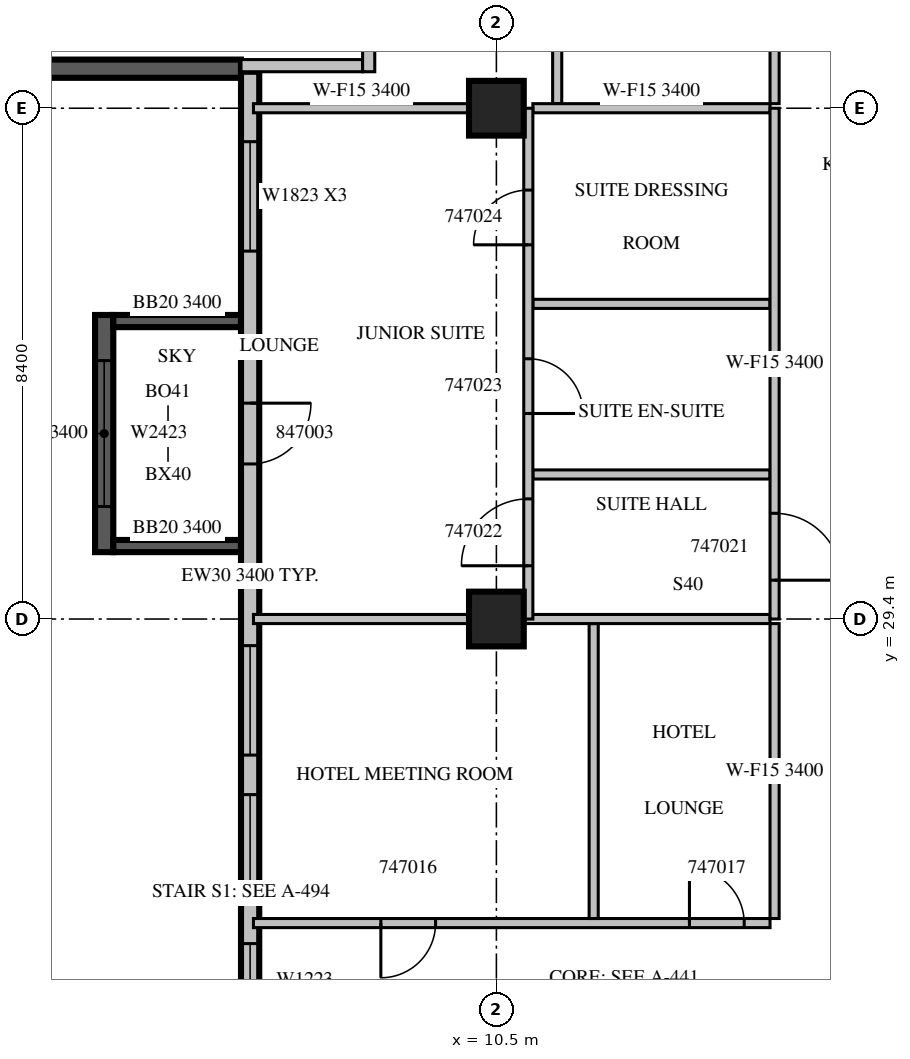
"""IFC4 building model, lengths in metres.
Left out: names, types, materials, properties, quantities, classifications, styles, units other than length and angle.
Written with IfcOpenShell. Run it as: python <this file> out.ifc"""

import sys

from ifc_helpers import new_model, si_unit, direction, frame, frame_2d, origin, origin_2d, place, context, subcontext, project, spatial, rectangle, extrude, source, transform, mapped, element, fill, save


model = new_model("IFC4")
c1 = context("Model", 3, precision=1e-05, world=origin(), true_north=direction((0.0, 1.0)))
c2 = subcontext(c1, "Body", "Model", "MODEL_VIEW")
j1 = project(units=[si_unit("LENGTHUNIT", "METRE"), si_unit("PLANEANGLEUNIT", "RADIAN")], contexts=[c1])
p1 = place(None, origin())
s1 = spatial("IfcSite", under=j1, at=p1, CompositionType="ELEMENT")
p2 = place(p1, origin())
s2 = spatial("IfcBuilding", under=s1, at=p2, CompositionType="ELEMENT")
p3 = place(p2, frame((0.0, 0.0, 212.0)))
s3 = spatial("IfcBuildingStorey", under=s2, at=p3, CompositionType="ELEMENT", Elevation=212.0)
m1 = source(origin(), c2, "Body", "SweptSolid", [
    extrude(rectangle(XDim=0.9, YDim=0.9, at=origin_2d()), origin(), (0.0, 0.0, 1.0), 3.8),
])
for number, where, z_axis, x_axis in (
    (1, (10.5, 29.4, 0.0), (0.0, 0.0, 1.0), (1.0, 0.0, 0.0)),
    (2, (10.5, 37.8, 0.0), (0.0, 0.0, 1.0), (1.0, 0.0, 0.0)),
):
    element("IfcColumn", number, at=place(p3, frame(where, z_axis=z_axis, x_axis=x_axis)), inside=s3, PredefinedType="COLUMN", context=c2, shape_type="MappedRepresentation", body=[
        mapped(m1, transform((0.0, 0.0, 0.0), scale=1.0)),
    ])
m2 = source(origin(), c2, "Body", "SweptSolid", [
    extrude(rectangle(XDim=3.9, YDim=0.3, at=frame_2d((1.95, 0.0))), origin(), (0.0, 0.0, 1.0), 3.4),
])
p4 = place(p3, frame((4.05, 34.4, 0.0), z_axis=(0.0, 0.0, 1.0), x_axis=(0.0, -1.0, 0.0)))
e3 = element("IfcWall", 3, at=p4, inside=s3, PredefinedType="SOLIDWALL", context=c2, shape_type="MappedRepresentation", body=[
    mapped(m2, transform((0.0, 0.0, 0.0), scale=1.0)),
])
m3 = source(origin(), c2, "Body", "SweptSolid", [
    extrude(rectangle(XDim=2.4, YDim=2.3, at=frame_2d((1.2, 1.15))), frame((0.0, 0.16, 0.0), z_axis=(0.0, -1.0, 0.0), x_axis=(1.0, 0.0, 0.0)), (0.0, 0.0, 1.0), 0.32),
])
p5 = place(p4, frame((0.75, 0.0, 0.6)))
e4 = element("IfcOpeningElement", 4, at=p5, cuts=e3, PredefinedType="OPENING", context=c2, shape_type="MappedRepresentation", body=[
    mapped(m3, transform((0.0, 0.0, 0.0), scale=1.0)),
])
m4 = source(origin(), c2, "Body", "SweptSolid", [
    extrude(rectangle(XDim=2.1, YDim=0.2, at=frame_2d((1.05, 0.0))), origin(), (0.0, 0.0, 1.0), 3.4),
])
for number, where, z_axis, x_axis in (
    (5, (6.3, 34.3, 0.0), (0.0, 0.0, 1.0), (-1.0, 0.0, 0.0)),
    (6, (6.3, 30.6, 0.0), (0.0, 0.0, 1.0), (-1.0, 0.0, 0.0)),
):
    element("IfcWall", number, at=place(p3, frame(where, z_axis=z_axis, x_axis=x_axis)), inside=s3, PredefinedType="SOLIDWALL", context=c2, shape_type="MappedRepresentation", body=[
        mapped(m4, transform((0.0, 0.0, 0.0), scale=1.0)),
    ])
m5 = source(origin(), c2, "Body", "SweptSolid", [
    extrude(rectangle(XDim=6.1, YDim=0.3, at=frame_2d((3.05, 0.0))), origin(), (0.0, 0.0, 1.0), 3.4),
])
p6 = place(p3, frame((0.2, 38.45, 0.0), z_axis=(0.0, 0.0, 1.0), x_axis=(1.0, 0.0, 0.0)))
e7 = element("IfcWall", 7, at=p6, inside=s3, PredefinedType="SOLIDWALL", context=c2, shape_type="MappedRepresentation", body=[
    mapped(m5, transform((0.0, 0.0, 0.0), scale=1.0)),
])
m6 = source(origin(), c2, "Body", "SweptSolid", [
    extrude(rectangle(XDim=16.6, YDim=0.3, at=frame_2d((8.3, 0.0))), origin(), (0.0, 0.0, 1.0), 3.4),
])
p7 = place(p3, frame((6.45, 38.4, 0.0), z_axis=(0.0, 0.0, 1.0), x_axis=(0.0, -1.0, 0.0)))
e8 = element("IfcWall", 8, at=p7, inside=s3, PredefinedType="STANDARD", context=c2, shape_type="MappedRepresentation", body=[
    mapped(m6, transform((0.0, 0.0, 0.0), scale=1.0)),
])
m7 = source(origin(), c2, "Body", "SweptSolid", [
    extrude(rectangle(XDim=1.8, YDim=2.3, at=frame_2d((0.9, 1.15))), frame((0.0, 0.16, 0.0), z_axis=(0.0, -1.0, 0.0), x_axis=(1.0, 0.0, 0.0)), (0.0, 0.0, 1.0), 0.32),
])
p8 = place(p7, frame((1.15, 0.0, 0.6)))
e9 = element("IfcOpeningElement", 9, at=p8, cuts=e8, PredefinedType="OPENING", context=c2, shape_type="MappedRepresentation", body=[
    mapped(m7, transform((0.0, 0.0, 0.0), scale=1.0)),
])
p9 = place(p7, frame((9.438, 0.0, 0.6)))
e10 = element("IfcOpeningElement", 10, at=p9, cuts=e8, PredefinedType="OPENING", context=c2, shape_type="MappedRepresentation", body=[
    mapped(m7, transform((0.0, 0.0, 0.0), scale=1.0)),
])
m8 = source(origin(), c2, "Body", "SweptSolid", [
    extrude(rectangle(XDim=1.2, YDim=2.3, at=frame_2d((0.6, 1.15))), frame((0.0, 0.16, 0.0), z_axis=(0.0, -1.0, 0.0), x_axis=(1.0, 0.0, 0.0)), (0.0, 0.0, 1.0), 0.32),
])
p10 = place(p7, frame((14.338, 0.0, 0.6)))
e11 = element("IfcOpeningElement", 11, at=p10, cuts=e8, PredefinedType="OPENING", context=c2, shape_type="MappedRepresentation", body=[
    mapped(m8, transform((0.0, 0.0, 0.0), scale=1.0)),
])
p11 = place(p7, frame((11.887, 0.0, 0.6)))
e12 = element("IfcOpeningElement", 12, at=p11, cuts=e8, PredefinedType="OPENING", context=c2, shape_type="MappedRepresentation", body=[
    mapped(m7, transform((0.0, 0.0, 0.0), scale=1.0)),
])
m9 = source(origin(), c2, "Body", "SweptSolid", [
    extrude(rectangle(XDim=1.0, YDim=2.1, at=frame_2d((0.5, 1.05))), frame((0.0, 0.16, 0.0), z_axis=(0.0, -1.0, 0.0), x_axis=(1.0, 0.0, 0.0)), (0.0, 0.0, 1.0), 0.32),
])
p12 = place(p7, frame((5.45, 0.0, 0.0)))
e13 = element("IfcOpeningElement", 13, at=p12, cuts=e8, PredefinedType="OPENING", context=c2, shape_type="MappedRepresentation", body=[
    mapped(m9, transform((0.0, 0.0, 0.0), scale=1.0)),
])
m10 = source(origin(), c2, "Body", "SweptSolid", [
    extrude(rectangle(XDim=2.0, YDim=0.2, at=frame_2d((1.0, 0.0))), origin(), (0.0, 0.0, 1.0), 3.4),
])
p13 = place(p3, frame((6.3, 38.5, 0.0), z_axis=(0.0, 0.0, 1.0), x_axis=(1.0, 0.0, 0.0)))
e14 = element("IfcWall", 14, at=p13, inside=s3, PredefinedType="PARTITIONING", context=c2, shape_type="MappedRepresentation", body=[
    mapped(m10, transform((0.0, 0.0, 0.0), scale=1.0)),
])
m11 = source(origin(), c2, "Body", "SweptSolid", [
    extrude(rectangle(XDim=5.45, YDim=0.2, at=frame_2d((2.725, 0.0))), origin(), (0.0, 0.0, 1.0), 3.4),
])
p14 = place(p3, frame((8.4, 38.4, 0.0), z_axis=(0.0, 0.0, 1.0), x_axis=(0.0, 1.0, 0.0)))
e15 = element("IfcWall", 15, at=p14, inside=s3, PredefinedType="PARTITIONING", context=c2, shape_type="MappedRepresentation", body=[
    mapped(m11, transform((0.0, 0.0, 0.0), scale=1.0)),
])
m12 = source(origin(), c2, "Body", "SweptSolid", [
    extrude(rectangle(XDim=1.2, YDim=2.1, at=frame_2d((0.6, 1.05))), frame((0.0, 0.11, 0.0), z_axis=(0.0, -1.0, 0.0), x_axis=(1.0, 0.0, 0.0)), (0.0, 0.0, 1.0), 0.22),
])
p15 = place(p14, frame((0.4, 0.0, 0.0)))
e16 = element("IfcOpeningElement", 16, at=p15, cuts=e15, PredefinedType="OPENING", context=c2, shape_type="MappedRepresentation", body=[
    mapped(m12, transform((0.0, 0.0, 0.0), scale=1.0)),
])
m13 = source(origin(), c2, "Body", "SweptSolid", [
    extrude(rectangle(XDim=0.9, YDim=2.1, at=frame_2d((0.45, 1.05))), frame((0.0, 0.11, 0.0), z_axis=(0.0, -1.0, 0.0), x_axis=(1.0, 0.0, 0.0)), (0.0, 0.0, 1.0), 0.22),
])
p16 = place(p14, frame((3.25, 0.0, 0.0)))
e17 = element("IfcOpeningElement", 17, at=p16, cuts=e15, PredefinedType="OPENING", context=c2, shape_type="MappedRepresentation", body=[
    mapped(m13, transform((0.0, 0.0, 0.0), scale=1.0)),
])
m14 = source(origin(), c2, "Body", "SweptSolid", [
    extrude(rectangle(XDim=8.495, YDim=0.15, at=frame_2d((4.247, 0.0))), origin(), (0.0, 0.0, 1.0), 3.4),
])
p17 = place(p3, frame((6.505, 24.4, 0.0), z_axis=(0.0, 0.0, 1.0), x_axis=(1.0, 0.0, 0.0)))
e18 = element("IfcWall", 18, at=p17, inside=s3, PredefinedType="PARTITIONING", context=c2, shape_type="MappedRepresentation", body=[
    mapped(m14, transform((0.0, 0.0, 0.0), scale=1.0)),
])
m15 = source(origin(), c2, "Body", "SweptSolid", [
    extrude(rectangle(XDim=0.9, YDim=2.1, at=frame_2d((0.45, 1.05))), frame((0.0, 0.085, 0.0), z_axis=(0.0, -1.0, 0.0), x_axis=(1.0, 0.0, 0.0)), (0.0, 0.0, 1.0), 0.17),
])
p18 = place(p17, frame((2.095, 0.0, 0.0)))
e19 = element("IfcOpeningElement", 19, at=p18, cuts=e18, PredefinedType="OPENING", context=c2, shape_type="MappedRepresentation", body=[
    mapped(m15, transform((0.0, 0.0, 0.0), scale=1.0)),
])
p19 = place(p17, frame((7.17, 0.0, 0.0)))
e20 = element("IfcOpeningElement", 20, at=p19, cuts=e18, PredefinedType="OPENING", context=c2, shape_type="MappedRepresentation", body=[
    mapped(m15, transform((0.0, 0.0, 0.0), scale=1.0)),
])
m16 = source(origin(), c2, "Body", "SweptSolid", [
    extrude(rectangle(XDim=4.85, YDim=0.15, at=frame_2d((2.425, 0.0))), origin(), (0.0, 0.0, 1.0), 3.4),
])
for number, where, z_axis, x_axis in (
    (21, (12.1, 24.475, 0.0), (0.0, 0.0, 1.0), (0.0, 1.0, 0.0)),
    (22, (15.075, 24.475, 0.0), (0.0, 0.0, 1.0), (0.0, 1.0, 0.0)),
):
    element("IfcWall", number, at=place(p3, frame(where, z_axis=z_axis, x_axis=x_axis)), inside=s3, PredefinedType="PARTITIONING", context=c2, shape_type="MappedRepresentation", body=[
        mapped(m16, transform((0.0, 0.0, 0.0), scale=1.0)),
    ])
m17 = source(origin(), c2, "Body", "SweptSolid", [
    extrude(rectangle(XDim=3.546, YDim=0.15, at=frame_2d((1.773, 0.0))), origin(), (0.0, 0.0, 1.0), 3.4),
])
p20 = place(p3, frame((10.051, 29.4, 0.0), z_axis=(0.0, 0.0, 1.0), x_axis=(-1.0, 0.0, 0.0)))
e23 = element("IfcWall", 23, at=p20, inside=s3, PredefinedType="PARTITIONING", context=c2, shape_type="MappedRepresentation", body=[
    mapped(m17, transform((0.0, 0.0, 0.0), scale=1.0)),
])
m18 = source(origin(), c2, "Body", "SweptSolid", [
    extrude(rectangle(XDim=4.051, YDim=0.15, at=frame_2d((2.026, 0.0))), origin(), (0.0, 0.0, 1.0), 3.4),
])
p21 = place(p3, frame((15.0, 29.4, 0.0), z_axis=(0.0, 0.0, 1.0), x_axis=(-1.0, 0.0, 0.0)))
e24 = element("IfcWall", 24, at=p21, inside=s3, PredefinedType="PARTITIONING", context=c2, shape_type="MappedRepresentation", body=[
    mapped(m18, transform((0.0, 0.0, 0.0), scale=1.0)),
])
m19 = source(origin(), c2, "Body", "SweptSolid", [
    extrude(rectangle(XDim=6.45, YDim=0.15, at=frame_2d((3.225, 0.0))), origin(), (0.0, 0.0, 1.0), 3.4),
])
p22 = place(p3, frame((11.5, 44.325, 0.0), z_axis=(0.0, 0.0, 1.0), x_axis=(0.0, -1.0, 0.0)))
e25 = element("IfcWall", 25, at=p22, inside=s3, PredefinedType="PARTITIONING", context=c2, shape_type="MappedRepresentation", body=[
    mapped(m19, transform((0.0, 0.0, 0.0), scale=1.0)),
])
p23 = place(p3, frame((15.075, 37.875, 0.0), z_axis=(0.0, 0.0, 1.0), x_axis=(0.0, 1.0, 0.0)))
e26 = element("IfcWall", 26, at=p23, inside=s3, PredefinedType="PARTITIONING", context=c2, shape_type="MappedRepresentation", body=[
    mapped(m19, transform((0.0, 0.0, 0.0), scale=1.0)),
])
p24 = place(p23, frame((2.737, 0.0, 0.0)))
e27 = element("IfcOpeningElement", 27, at=p24, cuts=e26, PredefinedType="OPENING", context=c2, shape_type="MappedRepresentation", body=[
    mapped(m15, transform((0.0, 0.0, 0.0), scale=1.0)),
])
m20 = source(origin(), c2, "Body", "SweptSolid", [
    extrude(rectangle(XDim=3.9, YDim=0.15, at=frame_2d((1.95, 0.0))), origin(), (0.0, 0.0, 1.0), 3.4),
])
for number, where, z_axis, x_axis in (
    (28, (15.0, 31.777, 0.0), (0.0, 0.0, 1.0), (-1.0, 0.0, 0.0)),
    (29, (15.0, 34.583, 0.0), (0.0, 0.0, 1.0), (-1.0, 0.0, 0.0)),
):
    element("IfcWall", number, at=place(p3, frame(where, z_axis=z_axis, x_axis=x_axis)), inside=s3, PredefinedType="PARTITIONING", context=c2, shape_type="MappedRepresentation", body=[
        mapped(m20, transform((0.0, 0.0, 0.0), scale=1.0)),
    ])
p25 = place(p3, frame((10.051, 37.8, 0.0), z_axis=(0.0, 0.0, 1.0), x_axis=(-1.0, 0.0, 0.0)))
e30 = element("IfcWall", 30, at=p25, inside=s3, PredefinedType="PARTITIONING", context=c2, shape_type="MappedRepresentation", body=[
    mapped(m17, transform((0.0, 0.0, 0.0), scale=1.0)),
])
p26 = place(p3, frame((15.0, 37.8, 0.0), z_axis=(0.0, 0.0, 1.0), x_axis=(-1.0, 0.0, 0.0)))
e31 = element("IfcWall", 31, at=p26, inside=s3, PredefinedType="PARTITIONING", context=c2, shape_type="MappedRepresentation", body=[
    mapped(m20, transform((0.0, 0.0, 0.0), scale=1.0)),
])
m21 = source(origin(), c2, "Body", "SweptSolid", [
    extrude(rectangle(XDim=8.4, YDim=0.15, at=frame_2d((4.2, 0.0))), origin(), (0.0, 0.0, 1.0), 3.4),
])
p27 = place(p3, frame((11.025, 29.4, 0.0), z_axis=(0.0, 0.0, 1.0), x_axis=(0.0, 1.0, 0.0)))
e32 = element("IfcWall", 32, at=p27, inside=s3, PredefinedType="PARTITIONING", context=c2, shape_type="MappedRepresentation", body=[
    mapped(m21, transform((0.0, 0.0, 0.0), scale=1.0)),
])
m22 = source(origin(), c2, "Body", "SweptSolid", [
    extrude(rectangle(XDim=1.1, YDim=2.1, at=frame_2d((0.55, 1.05))), frame((0.0, 0.085, 0.0), z_axis=(0.0, -1.0, 0.0), x_axis=(1.0, 0.0, 0.0)), (0.0, 0.0, 1.0), 0.17),
])
p28 = place(p27, frame((0.876, 0.0, 0.0)))
e33 = element("IfcOpeningElement", 33, at=p28, cuts=e32, PredefinedType="OPENING", context=c2, shape_type="MappedRepresentation", body=[
    mapped(m22, transform((0.0, 0.0, 0.0), scale=1.0)),
])
p29 = place(p27, frame((3.38, 0.0, 0.0)))
e34 = element("IfcOpeningElement", 34, at=p29, cuts=e32, PredefinedType="OPENING", context=c2, shape_type="MappedRepresentation", body=[
    mapped(m15, transform((0.0, 0.0, 0.0), scale=1.0)),
])
p30 = place(p27, frame((6.154, 0.0, 0.0)))
e35 = element("IfcOpeningElement", 35, at=p30, cuts=e32, PredefinedType="OPENING", context=c2, shape_type="MappedRepresentation", body=[
    mapped(m15, transform((0.0, 0.0, 0.0), scale=1.0)),
])
p31 = place(p3, frame((15.075, 29.4, 0.0), z_axis=(0.0, 0.0, 1.0), x_axis=(0.0, 1.0, 0.0)))
e36 = element("IfcWall", 36, at=p31, inside=s3, PredefinedType="PARTITIONING", context=c2, shape_type="MappedRepresentation", body=[
    mapped(m21, transform((0.0, 0.0, 0.0), scale=1.0)),
])
p32 = place(p31, frame((0.638, 0.0, 0.0)))
e37 = element("IfcOpeningElement", 37, at=p32, cuts=e36, PredefinedType="OPENING", context=c2, shape_type="MappedRepresentation", body=[
    mapped(m22, transform((0.0, 0.0, 0.0), scale=1.0)),
])
m23 = source(origin(), c2, "Body", "SweptSolid", [
    extrude(rectangle(XDim=2.4, YDim=2.3, at=frame_2d((1.2, 1.15))), frame((0.0, 0.03, 0.0), z_axis=(0.0, -1.0, 0.0), x_axis=(1.0, 0.0, 0.0)), (0.0, 0.0, 1.0), 0.06),
])
p33 = place(p5, origin())
e38 = element("IfcWindow", 38, at=p33, inside=s3, PartitioningType="SINGLE_PANEL", PredefinedType="WINDOW", context=c2, shape_type="MappedRepresentation", body=[
    mapped(m23, transform((0.0, 0.0, 0.0), scale=1.0)),
])
fill(e4, e38)
m24 = source(origin(), c2, "Body", "SweptSolid", [
    extrude(rectangle(XDim=1.8, YDim=2.3, at=frame_2d((0.9, 1.15))), frame((0.0, 0.03, 0.0), z_axis=(0.0, -1.0, 0.0), x_axis=(1.0, 0.0, 0.0)), (0.0, 0.0, 1.0), 0.06),
])
p34 = place(p8, origin())
e39 = element("IfcWindow", 39, at=p34, inside=s3, PartitioningType="SINGLE_PANEL", PredefinedType="WINDOW", context=c2, shape_type="MappedRepresentation", body=[
    mapped(m24, transform((0.0, 0.0, 0.0), scale=1.0)),
])
fill(e9, e39)
p35 = place(p9, origin())
e40 = element("IfcWindow", 40, at=p35, inside=s3, PartitioningType="SINGLE_PANEL", PredefinedType="WINDOW", context=c2, shape_type="MappedRepresentation", body=[
    mapped(m24, transform((0.0, 0.0, 0.0), scale=1.0)),
])
fill(e10, e40)
m25 = source(origin(), c2, "Body", "SweptSolid", [
    extrude(rectangle(XDim=1.2, YDim=2.3, at=frame_2d((0.6, 1.15))), frame((0.0, 0.03, 0.0), z_axis=(0.0, -1.0, 0.0), x_axis=(1.0, 0.0, 0.0)), (0.0, 0.0, 1.0), 0.06),
])
p36 = place(p10, origin())
e41 = element("IfcWindow", 41, at=p36, inside=s3, PartitioningType="SINGLE_PANEL", PredefinedType="WINDOW", context=c2, shape_type="MappedRepresentation", body=[
    mapped(m25, transform((0.0, 0.0, 0.0), scale=1.0)),
])
fill(e11, e41)
p37 = place(p11, origin())
e42 = element("IfcWindow", 42, at=p37, inside=s3, PartitioningType="SINGLE_PANEL", PredefinedType="WINDOW", context=c2, shape_type="MappedRepresentation", body=[
    mapped(m24, transform((0.0, 0.0, 0.0), scale=1.0)),
])
fill(e12, e42)
m26 = source(origin(), c2, "Body", "SweptSolid", [
    extrude(rectangle(XDim=0.9, YDim=2.1, at=frame_2d((0.45, 1.05))), frame((0.0, 0.025, 0.0), z_axis=(0.0, -1.0, 0.0), x_axis=(1.0, 0.0, 0.0)), (0.0, 0.0, 1.0), 0.05),
])
p38 = place(p18, origin())
e43 = element("IfcDoor", 43, at=p38, inside=s3, OperationType="SINGLE_SWING_RIGHT", PredefinedType="DOOR", context=c2, shape_type="MappedRepresentation", body=[
    mapped(m26, transform((0.0, 0.0, 0.0), scale=1.0)),
])
fill(e19, e43)
p39 = place(p19, origin())
e44 = element("IfcDoor", 44, at=p39, inside=s3, OperationType="SINGLE_SWING_LEFT", PredefinedType="DOOR", context=c2, shape_type="MappedRepresentation", body=[
    mapped(m26, transform((0.0, 0.0, 0.0), scale=1.0)),
])
fill(e20, e44)
m27 = source(origin(), c2, "Body", "SweptSolid", [
    extrude(rectangle(XDim=1.1, YDim=2.1, at=frame_2d((0.55, 1.05))), frame((0.0, 0.025, 0.0), z_axis=(0.0, -1.0, 0.0), x_axis=(1.0, 0.0, 0.0)), (0.0, 0.0, 1.0), 0.05),
])
p40 = place(p32, origin())
e45 = element("IfcDoor", 45, at=p40, inside=s3, OperationType="SINGLE_SWING_RIGHT", PredefinedType="DOOR", context=c2, shape_type="MappedRepresentation", body=[
    mapped(m27, transform((0.0, 0.0, 0.0), scale=1.0)),
])
fill(e37, e45)
p41 = place(p28, origin())
e46 = element("IfcDoor", 46, at=p41, inside=s3, OperationType="SINGLE_SWING_LEFT", PredefinedType="DOOR", context=c2, shape_type="MappedRepresentation", body=[
    mapped(m27, transform((0.0, 0.0, 0.0), scale=1.0)),
])
fill(e33, e46)
p42 = place(p29, origin())
e47 = element("IfcDoor", 47, at=p42, inside=s3, OperationType="SINGLE_SWING_RIGHT", PredefinedType="DOOR", context=c2, shape_type="MappedRepresentation", body=[
    mapped(m26, transform((0.0, 0.0, 0.0), scale=1.0)),
])
fill(e34, e47)
p43 = place(p30, origin())
e48 = element("IfcDoor", 48, at=p43, inside=s3, OperationType="SINGLE_SWING_LEFT", PredefinedType="DOOR", context=c2, shape_type="MappedRepresentation", body=[
    mapped(m26, transform((0.0, 0.0, 0.0), scale=1.0)),
])
fill(e35, e48)
m28 = source(origin(), c2, "Body", "SweptSolid", [
    extrude(rectangle(XDim=1.0, YDim=2.1, at=frame_2d((0.5, 1.05))), frame((0.0, 0.025, 0.0), z_axis=(0.0, -1.0, 0.0), x_axis=(1.0, 0.0, 0.0)), (0.0, 0.0, 1.0), 0.05),
])
p44 = place(p12, origin())
e49 = element("IfcDoor", 49, at=p44, inside=s3, OperationType="SINGLE_SWING_LEFT", PredefinedType="DOOR", context=c2, shape_type="MappedRepresentation", body=[
    mapped(m28, transform((0.0, 0.0, 0.0), scale=1.0)),
])
fill(e13, e49)
save(model, sys.argv[1])
